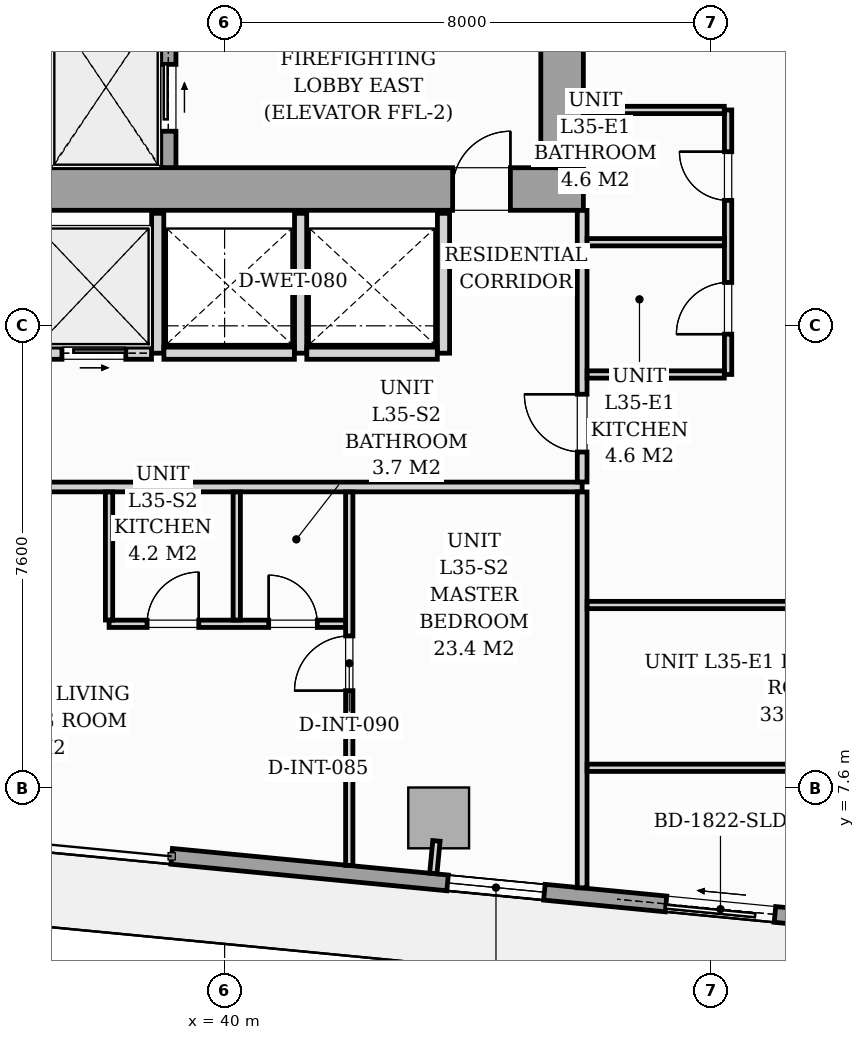
"""IFC4 building model, lengths in metres.
Left out: names, types, materials, properties, quantities, classifications, styles, units other than length and angle.
Written with IfcOpenShell. Run it as: python <this file> out.ifc"""

import sys

from ifc_helpers import new_model, si_unit, direction, frame, frame_2d, origin, origin_2d, place, context, subcontext, project, spatial, rectangle, i_section, extrude, source, transform, mapped, element, fill, save


model = new_model("IFC4")
c1 = context("Model", 3, precision=1e-05, world=origin(), true_north=direction((0.0, 1.0)))
c2 = subcontext(c1, "Body", "Model", "MODEL_VIEW")
j1 = project(units=[si_unit("LENGTHUNIT", "METRE"), si_unit("PLANEANGLEUNIT", "RADIAN")], contexts=[c1])
p1 = place(None, origin())
s1 = spatial("IfcSite", under=j1, at=p1, CompositionType="ELEMENT")
p2 = place(p1, origin())
s2 = spatial("IfcBuilding", under=s1, at=p2, CompositionType="ELEMENT")
p3 = place(p2, frame((0.0, 0.0, 124.6)))
s3 = spatial("IfcBuildingStorey", under=s2, at=p3, CompositionType="ELEMENT", Elevation=124.6)
m1 = source(origin(), c2, "Body", "SweptSolid", [
    extrude(i_section(OverallWidth=0.421, OverallDepth=0.465, WebThickness=0.045, FlangeThickness=0.073, FilletRadius=0.018, at=origin_2d()), origin(), (0.0, 0.0, 1.0), 3.196),
])
for number, where, z_axis, x_axis in (
    (1, (38.88, 17.4, 0.002), (0.0, 0.0, 1.0), (1.0, 0.0, 0.0)),
    (2, (45.6, 17.4, 0.002), (0.0, 0.0, 1.0), (1.0, 0.0, 0.0)),
):
    element("IfcColumn", number, at=place(p3, frame(where, z_axis=z_axis, x_axis=x_axis)), inside=s3, PredefinedType="PILASTER", context=c2, shape_type="MappedRepresentation", body=[
        mapped(m1, transform((0.0, 0.0, 0.0), scale=1.0)),
    ])
m2 = source(origin(), c2, "Body", "SweptSolid", [
    extrude(rectangle(XDim=1.0, YDim=1.0, at=origin_2d()), origin(), (0.0, 0.0, 1.0), 3.194),
])
p4 = place(p3, frame((43.521, 7.108, 0.004), z_axis=(0.0, 0.0, 1.0), x_axis=(0.995396198367, -0.09584575252, 0.0)))
e3 = element("IfcColumn", 3, at=p4, inside=s3, PredefinedType="COLUMN", context=c2, shape_type="MappedRepresentation", body=[
    mapped(m2, transform((0.0, 0.0, 0.0), scale=1.0)),
])
p5 = place(p3, frame((56.061, 4.845, 0.0), z_axis=(0.0, 0.0, 1.0), x_axis=(-0.995395976631, 0.095848055311, 0.0)))
e4 = element("IfcWall", 4, at=p5, inside=s3, PredefinedType="STANDARD", context=c2, shape_type="SweptSolid", body=[
    extrude(rectangle(XDim=17.01, YDim=0.26, at=frame_2d((8.505, 0.0))), origin(), (0.0, 0.0, 1.0), 2.94),
])
p6 = place(p5, frame((7.043, 0.0, 0.0)))
e5 = element("IfcOpeningElement", 5, at=p6, cuts=e4, PredefinedType="OPENING", context=c2, shape_type="SweptSolid", body=[
    extrude(rectangle(XDim=1.8, YDim=2.06, at=frame_2d((0.9, 1.03))), frame((0.0, 0.14, 0.0), z_axis=(0.0, -1.0, 0.0), x_axis=(1.0, 0.0, 0.0)), (0.0, 0.0, 1.0), 0.28),
])
p7 = place(p5, frame((2.05, 0.0, 0.65)))
e6 = element("IfcOpeningElement", 6, at=p7, cuts=e4, PredefinedType="OPENING", context=c2, shape_type="SweptSolid", body=[
    extrude(rectangle(XDim=1.6, YDim=1.5, at=frame_2d((0.8, 0.75))), frame((0.0, 0.14, 0.0), z_axis=(0.0, -1.0, 0.0), x_axis=(1.0, 0.0, 0.0)), (0.0, 0.0, 1.0), 0.28),
])
p8 = place(p5, frame((10.852, 0.0, 0.75)))
e7 = element("IfcOpeningElement", 7, at=p8, cuts=e4, PredefinedType="OPENING", context=c2, shape_type="SweptSolid", body=[
    extrude(rectangle(XDim=1.6, YDim=1.5, at=frame_2d((0.8, 0.75))), frame((0.0, 0.14, 0.0), z_axis=(0.0, -1.0, 0.0), x_axis=(1.0, 0.0, 0.0)), (0.0, 0.0, 1.0), 0.28),
])
p9 = place(p3, frame((26.1, 17.45, 0.0), z_axis=(0.0, 0.0, 1.0), x_axis=(1.0, 0.0, 0.0)))
e8 = element("IfcWall", 8, at=p9, inside=s3, PredefinedType="SHEAR", context=c2, shape_type="SweptSolid", body=[
    extrude(rectangle(XDim=19.8, YDim=0.7, at=frame_2d((9.9, 0.0))), origin(), (0.0, 0.0, 1.0), 3.2),
])
p10 = place(p9, frame((1.05, 0.0, 0.0)))
e9 = element("IfcOpeningElement", 9, at=p10, cuts=e8, PredefinedType="OPENING", context=c2, shape_type="SweptSolid", body=[
    extrude(rectangle(XDim=0.95, YDim=2.06, at=frame_2d((0.475, 1.03))), frame((0.0, 0.36, 0.0), z_axis=(0.0, -1.0, 0.0), x_axis=(1.0, 0.0, 0.0)), (0.0, 0.0, 1.0), 0.72),
])
p11 = place(p9, frame((9.48, 0.0, 0.0)))
e10 = element("IfcOpeningElement", 10, at=p11, cuts=e8, PredefinedType="OPENING", context=c2, shape_type="SweptSolid", body=[
    extrude(rectangle(XDim=0.85, YDim=2.0, at=frame_2d((0.425, 1.0))), frame((0.0, 0.36, 0.0), z_axis=(0.0, -1.0, 0.0), x_axis=(1.0, 0.0, 0.0)), (0.0, 0.0, 1.0), 0.72),
])
p12 = place(p9, frame((17.65, 0.0, 0.0)))
e11 = element("IfcOpeningElement", 11, at=p12, cuts=e8, PredefinedType="OPENING", context=c2, shape_type="SweptSolid", body=[
    extrude(rectangle(XDim=0.95, YDim=2.06, at=frame_2d((0.475, 1.03))), frame((0.0, 0.36, 0.0), z_axis=(0.0, -1.0, 0.0), x_axis=(1.0, 0.0, 0.0)), (0.0, 0.0, 1.0), 0.72),
])
p13 = place(p3, frame((45.55, 17.802, 0.0), z_axis=(0.0, 0.0, 1.0), x_axis=(0.0, 1.0, 0.0)))
e12 = element("IfcWall", 12, at=p13, inside=s3, PredefinedType="SHEAR", context=c2, shape_type="SweptSolid", body=[
    extrude(rectangle(XDim=5.796, YDim=0.7, at=frame_2d((2.898, 0.0))), origin(), (0.0, 0.0, 1.0), 3.2),
])
p14 = place(p3, frame((37.1, 17.802, 0.0), z_axis=(0.0, 0.0, 1.0), x_axis=(0.0, 1.0, 0.0)))
e13 = element("IfcWall", 13, at=p14, inside=s3, PredefinedType="PARTITIONING", context=c2, shape_type="SweptSolid", body=[
    extrude(rectangle(XDim=2.646, YDim=0.16, at=frame_2d((1.323, 0.0))), origin(), (0.0, 0.0, 1.0), 2.94),
])
p15 = place(p3, frame((39.075, 17.802, 0.0), z_axis=(0.0, 0.0, 1.0), x_axis=(0.0, 1.0, 0.0)))
e14 = element("IfcWall", 14, at=p15, inside=s3, PredefinedType="SOLIDWALL", context=c2, shape_type="SweptSolid", body=[
    extrude(rectangle(XDim=2.646, YDim=0.25, at=frame_2d((1.323, 0.0))), origin(), (0.0, 0.0, 1.0), 3.2),
])
p16 = place(p15, frame((0.598, 0.0, 0.0)))
e15 = element("IfcOpeningElement", 15, at=p16, cuts=e14, PredefinedType="OPENING", context=c2, shape_type="SweptSolid", body=[
    extrude(rectangle(XDim=1.1, YDim=2.08, at=frame_2d((0.55, 1.04))), frame((0.0, 0.135, 0.0), z_axis=(0.0, -1.0, 0.0), x_axis=(1.0, 0.0, 0.0)), (0.0, 0.0, 1.0), 0.27),
])
p17 = place(p3, frame((38.9, 14.75, 0.0), z_axis=(0.0, 0.0, 1.0), x_axis=(0.0, 1.0, 0.0)))
e16 = element("IfcWall", 16, at=p17, inside=s3, PredefinedType="PARTITIONING", context=c2, shape_type="SweptSolid", body=[
    extrude(rectangle(XDim=2.3, YDim=0.2, at=frame_2d((1.15, 0.0))), origin(), (0.0, 0.0, 1.0), 2.94),
])
p18 = place(p3, frame((36.902, 14.75, 0.0), z_axis=(0.0, 0.0, 1.0), x_axis=(1.0, 0.0, 0.0)))
e17 = element("IfcWall", 17, at=p18, inside=s3, PredefinedType="PARTITIONING", context=c2, shape_type="SweptSolid", body=[
    extrude(rectangle(XDim=1.896, YDim=0.2, at=frame_2d((0.948, 0.0))), origin(), (0.0, 0.0, 1.0), 2.94),
])
p19 = place(p18, frame((0.423, 0.0, 0.0)))
e18 = element("IfcOpeningElement", 18, at=p19, cuts=e17, PredefinedType="OPENING", context=c2, shape_type="SweptSolid", body=[
    extrude(rectangle(XDim=1.05, YDim=2.08, at=frame_2d((0.525, 1.04))), frame((0.0, 0.11, 0.0), z_axis=(0.0, -1.0, 0.0), x_axis=(1.0, 0.0, 0.0)), (0.0, 0.0, 1.0), 0.22),
])
for number, where, z_axis, x_axis in (
    (19, (41.25, 14.75, 0.0), (0.0, 0.0, 1.0), (0.0, 1.0, 0.0)),
    (20, (43.6, 14.75, 0.0), (0.0, 0.0, 1.0), (0.0, 1.0, 0.0)),
):
    element("IfcWall", number, at=place(p3, frame(where, z_axis=z_axis, x_axis=x_axis)), inside=s3, PredefinedType="PARTITIONING", context=c2, shape_type="SweptSolid", body=[
        extrude(rectangle(XDim=2.3, YDim=0.2, at=frame_2d((1.15, 0.0))), origin(), (0.0, 0.0, 1.0), 2.94),
    ])
for number, where, z_axis, x_axis in (
    (21, (39.002, 14.75, 0.0), (0.0, 0.0, 1.0), (1.0, 0.0, 0.0)),
    (22, (41.352, 14.75, 0.0), (0.0, 0.0, 1.0), (1.0, 0.0, 0.0)),
):
    element("IfcWall", number, at=place(p3, frame(where, z_axis=z_axis, x_axis=x_axis)), inside=s3, PredefinedType="PARTITIONING", context=c2, shape_type="SweptSolid", body=[
        extrude(rectangle(XDim=2.146, YDim=0.2, at=frame_2d((1.073, 0.0))), origin(), (0.0, 0.0, 1.0), 2.94),
    ])
p20 = place(p3, frame((22.05, 12.55, 0.0), z_axis=(0.0, 0.0, 1.0), x_axis=(1.0, 0.0, 0.0)))
e23 = element("IfcWall", 23, at=p20, inside=s3, PredefinedType="PARTITIONING", context=c2, shape_type="SweptSolid", body=[
    extrude(rectangle(XDim=23.83, YDim=0.16, at=frame_2d((11.915, 0.0))), origin(), (0.0, 0.0, 1.0), 2.94),
])
p21 = place(p20, frame((0.655, 0.0, 0.0)))
e24 = element("IfcOpeningElement", 24, at=p21, cuts=e23, PredefinedType="OPENING", context=c2, shape_type="SweptSolid", body=[
    extrude(rectangle(XDim=0.95, YDim=2.06, at=frame_2d((0.475, 1.03))), frame((0.0, 0.09, 0.0), z_axis=(0.0, -1.0, 0.0), x_axis=(1.0, 0.0, 0.0)), (0.0, 0.0, 1.0), 0.18),
])
p22 = place(p20, frame((12.04, 0.0, 0.0)))
e25 = element("IfcOpeningElement", 25, at=p22, cuts=e23, PredefinedType="OPENING", context=c2, shape_type="SweptSolid", body=[
    extrude(rectangle(XDim=0.95, YDim=2.06, at=frame_2d((0.475, 1.03))), frame((0.0, 0.09, 0.0), z_axis=(0.0, -1.0, 0.0), x_axis=(1.0, 0.0, 0.0)), (0.0, 0.0, 1.0), 0.18),
])
p23 = place(p3, frame((45.88, 5.958, 0.0), z_axis=(0.0, 0.0, 1.0), x_axis=(0.0, 1.0, 0.0)))
e26 = element("IfcWall", 26, at=p23, inside=s3, PredefinedType="PARTITIONING", context=c2, shape_type="SweptSolid", body=[
    extrude(rectangle(XDim=6.51, YDim=0.16, at=frame_2d((3.255, 0.0))), origin(), (0.0, 0.0, 1.0), 2.94),
])
p24 = place(p3, frame((45.88, 12.632, 0.0), z_axis=(0.0, 0.0, 1.0), x_axis=(0.0, 1.0, 0.0)))
e27 = element("IfcWall", 27, at=p24, inside=s3, PredefinedType="PARTITIONING", context=c2, shape_type="SweptSolid", body=[
    extrude(rectangle(XDim=4.466, YDim=0.16, at=frame_2d((2.233, 0.0))), origin(), (0.0, 0.0, 1.0), 2.94),
])
p25 = place(p24, frame((0.493, 0.0, 0.0)))
e28 = element("IfcOpeningElement", 28, at=p25, cuts=e27, PredefinedType="OPENING", context=c2, shape_type="SweptSolid", body=[
    extrude(rectangle(XDim=0.95, YDim=2.06, at=frame_2d((0.475, 1.03))), frame((0.0, 0.09, 0.0), z_axis=(0.0, -1.0, 0.0), x_axis=(1.0, 0.0, 0.0)), (0.0, 0.0, 1.0), 0.18),
])
p26 = place(p3, frame((42.05, 6.327, 0.0), z_axis=(0.0, 0.0, 1.0), x_axis=(0.0, 1.0, 0.0)))
e29 = element("IfcWall", 29, at=p26, inside=s3, PredefinedType="PARTITIONING", context=c2, shape_type="SweptSolid", body=[
    extrude(rectangle(XDim=6.141, YDim=0.12, at=frame_2d((3.07, 0.0))), origin(), (0.0, 0.0, 1.0), 2.94),
])
p27 = place(p26, frame((2.873, 0.0, 0.0)))
e30 = element("IfcOpeningElement", 30, at=p27, cuts=e29, PredefinedType="OPENING", context=c2, shape_type="SweptSolid", body=[
    extrude(rectangle(XDim=0.9, YDim=2.05, at=frame_2d((0.45, 1.025))), frame((0.0, 0.07, 0.0), z_axis=(0.0, -1.0, 0.0), x_axis=(1.0, 0.0, 0.0)), (0.0, 0.0, 1.0), 0.14),
])
p28 = place(p3, frame((38.1, 10.3, 0.0), z_axis=(0.0, 0.0, 1.0), x_axis=(1.0, 0.0, 0.0)))
e31 = element("IfcWall", 31, at=p28, inside=s3, PredefinedType="PARTITIONING", context=c2, shape_type="SweptSolid", body=[
    extrude(rectangle(XDim=3.888, YDim=0.12, at=frame_2d((1.944, 0.0))), origin(), (0.0, 0.0, 1.0), 2.94),
])
p29 = place(p28, frame((0.625, 0.0, 0.0)))
e32 = element("IfcOpeningElement", 32, at=p29, cuts=e31, PredefinedType="OPENING", context=c2, shape_type="SweptSolid", body=[
    extrude(rectangle(XDim=0.85, YDim=2.05, at=frame_2d((0.425, 1.025))), frame((0.0, 0.07, 0.0), z_axis=(0.0, -1.0, 0.0), x_axis=(1.0, 0.0, 0.0)), (0.0, 0.0, 1.0), 0.14),
])
p30 = place(p28, frame((2.625, 0.0, 0.0)))
e33 = element("IfcOpeningElement", 33, at=p30, cuts=e31, PredefinedType="OPENING", context=c2, shape_type="SweptSolid", body=[
    extrude(rectangle(XDim=0.8, YDim=2.02, at=frame_2d((0.4, 1.01))), frame((0.0, 0.07, 0.0), z_axis=(0.0, -1.0, 0.0), x_axis=(1.0, 0.0, 0.0)), (0.0, 0.0, 1.0), 0.14),
])
for number, where, z_axis, x_axis in (
    (34, (40.2, 10.362, 0.0), (0.0, 0.0, 1.0), (0.0, 1.0, 0.0)),
    (35, (38.1, 10.362, 0.0), (0.0, 0.0, 1.0), (0.0, 1.0, 0.0)),
):
    element("IfcWall", number, at=place(p3, frame(where, z_axis=z_axis, x_axis=x_axis)), inside=s3, PredefinedType="PARTITIONING", context=c2, shape_type="SweptSolid", body=[
        extrude(rectangle(XDim=2.106, YDim=0.12, at=frame_2d((1.053, 0.0))), origin(), (0.0, 0.0, 1.0), 2.94),
    ])
p31 = place(p3, frame((48.28, 14.4, 0.0), z_axis=(0.0, 0.0, 1.0), x_axis=(0.0, 1.0, 0.0)))
e36 = element("IfcWall", 36, at=p31, inside=s3, PredefinedType="PARTITIONING", context=c2, shape_type="SweptSolid", body=[
    extrude(rectangle(XDim=4.35, YDim=0.12, at=frame_2d((2.175, 0.0))), origin(), (0.0, 0.0, 1.0), 2.94),
])
p32 = place(p31, frame((0.663, 0.0, 0.0)))
e37 = element("IfcOpeningElement", 37, at=p32, cuts=e36, PredefinedType="OPENING", context=c2, shape_type="SweptSolid", body=[
    extrude(rectangle(XDim=0.85, YDim=2.05, at=frame_2d((0.425, 1.025))), frame((0.0, 0.07, 0.0), z_axis=(0.0, -1.0, 0.0), x_axis=(1.0, 0.0, 0.0)), (0.0, 0.0, 1.0), 0.14),
])
p33 = place(p31, frame((2.863, 0.0, 0.0)))
e38 = element("IfcOpeningElement", 38, at=p33, cuts=e36, PredefinedType="OPENING", context=c2, shape_type="SweptSolid", body=[
    extrude(rectangle(XDim=0.8, YDim=2.02, at=frame_2d((0.4, 1.01))), frame((0.0, 0.07, 0.0), z_axis=(0.0, -1.0, 0.0), x_axis=(1.0, 0.0, 0.0)), (0.0, 0.0, 1.0), 0.14),
])
for number, where, z_axis, x_axis in (
    (39, (45.962, 16.575, 0.0), (0.0, 0.0, 1.0), (1.0, 0.0, 0.0)),
    (40, (45.962, 14.4, 0.0), (0.0, 0.0, 1.0), (1.0, 0.0, 0.0)),
):
    element("IfcWall", number, at=place(p3, frame(where, z_axis=z_axis, x_axis=x_axis)), inside=s3, PredefinedType="PARTITIONING", context=c2, shape_type="SweptSolid", body=[
        extrude(rectangle(XDim=2.256, YDim=0.12, at=frame_2d((1.128, 0.0))), origin(), (0.0, 0.0, 1.0), 2.94),
    ])
p34 = place(p3, frame((45.902, 18.75, 0.0), z_axis=(0.0, 0.0, 1.0), x_axis=(1.0, 0.0, 0.0)))
e41 = element("IfcWall", 41, at=p34, inside=s3, PredefinedType="PARTITIONING", context=c2, shape_type="SweptSolid", body=[
    extrude(rectangle(XDim=2.316, YDim=0.12, at=frame_2d((1.158, 0.0))), origin(), (0.0, 0.0, 1.0), 2.94),
])
p35 = place(p3, frame((45.962, 7.932, 0.0), z_axis=(0.0, 0.0, 1.0), x_axis=(1.0, 0.0, 0.0)))
e42 = element("IfcWall", 42, at=p35, inside=s3, PredefinedType="PARTITIONING", context=c2, shape_type="SweptSolid", body=[
    extrude(rectangle(XDim=12.828, YDim=0.12, at=frame_2d((6.414, 0.0))), origin(), (0.0, 0.0, 1.0), 2.94),
])
p36 = place(p35, frame((5.995, 0.0, 0.0)))
e43 = element("IfcOpeningElement", 43, at=p36, cuts=e42, PredefinedType="OPENING", context=c2, shape_type="SweptSolid", body=[
    extrude(rectangle(XDim=0.85, YDim=2.05, at=frame_2d((0.425, 1.025))), frame((0.0, 0.07, 0.0), z_axis=(0.0, -1.0, 0.0), x_axis=(1.0, 0.0, 0.0)), (0.0, 0.0, 1.0), 0.14),
])
p37 = place(p3, frame((45.962, 10.609, 0.0), z_axis=(0.0, 0.0, 1.0), x_axis=(1.0, 0.0, 0.0)))
e44 = element("IfcWall", 44, at=p37, inside=s3, PredefinedType="PARTITIONING", context=c2, shape_type="SweptSolid", body=[
    extrude(rectangle(XDim=13.085, YDim=0.12, at=frame_2d((6.543, 0.0))), origin(), (0.0, 0.0, 1.0), 2.94),
])
p38 = place(p37, frame((7.94, 0.0, 0.0)))
e45 = element("IfcOpeningElement", 45, at=p38, cuts=e44, PredefinedType="OPENING", context=c2, shape_type="SweptSolid", body=[
    extrude(rectangle(XDim=0.85, YDim=2.05, at=frame_2d((0.425, 1.025))), frame((0.0, 0.07, 0.0), z_axis=(0.0, -1.0, 0.0), x_axis=(1.0, 0.0, 0.0)), (0.0, 0.0, 1.0), 0.14),
])
p39 = place(p3, frame((43.484, 6.729, 0.0), z_axis=(0.0, 0.0, 1.0), x_axis=(-0.095772948675, -0.995403205893, 0.0)))
e46 = element("IfcWall", 46, at=p39, inside=s3, PredefinedType="PARTITIONING", context=c2, shape_type="SweptSolid", body=[
    extrude(rectangle(XDim=0.538, YDim=0.12, at=frame_2d((0.269, 0.0))), origin(), (0.0, 0.0, 1.0), 2.94),
])
m3 = source(origin(), c2, "Body", "SweptSolid", [
    extrude(rectangle(XDim=1.8, YDim=2.06, at=frame_2d((0.9, 1.03))), frame((0.0, 0.025, 0.0), z_axis=(0.0, -1.0, 0.0), x_axis=(1.0, 0.0, 0.0)), (0.0, 0.0, 1.0), 0.05),
])
p40 = place(p6, origin())
e47 = element("IfcDoor", 47, at=p40, inside=s3, OperationType="SLIDING_TO_RIGHT", PredefinedType="DOOR", context=c2, shape_type="MappedRepresentation", body=[
    mapped(m3, transform((0.0, 0.0, 0.0), scale=1.0)),
])
fill(e5, e47)
m4 = source(origin(), c2, "Body", "SweptSolid", [
    extrude(rectangle(XDim=1.6, YDim=1.5, at=frame_2d((0.8, 0.75))), frame((0.0, 0.03, 0.0), z_axis=(0.0, -1.0, 0.0), x_axis=(1.0, 0.0, 0.0)), (0.0, 0.0, 1.0), 0.06),
])
p41 = place(p8, origin())
e48 = element("IfcWindow", 48, at=p41, inside=s3, PartitioningType="SINGLE_PANEL", PredefinedType="WINDOW", context=c2, shape_type="MappedRepresentation", body=[
    mapped(m4, transform((0.0, 0.0, 0.0), scale=1.0)),
])
fill(e7, e48)
m5 = source(origin(), c2, "Body", "SweptSolid", [
    extrude(rectangle(XDim=0.95, YDim=2.06, at=frame_2d((0.475, 1.03))), frame((0.0, 0.025, 0.0), z_axis=(0.0, -1.0, 0.0), x_axis=(1.0, 0.0, 0.0)), (0.0, 0.0, 1.0), 0.05),
])
p42 = place(p12, origin())
e49 = element("IfcDoor", 49, at=p42, inside=s3, OperationType="SINGLE_SWING_RIGHT", PredefinedType="DOOR", context=c2, shape_type="MappedRepresentation", body=[
    mapped(m5, transform((0.0, 0.0, 0.0), scale=1.0)),
])
fill(e11, e49)
m6 = source(origin(), c2, "Body", "SweptSolid", [
    extrude(rectangle(XDim=1.1, YDim=2.08, at=frame_2d((0.55, 1.04))), frame((0.0, 0.025, 0.0), z_axis=(0.0, -1.0, 0.0), x_axis=(1.0, 0.0, 0.0)), (0.0, 0.0, 1.0), 0.05),
])
p43 = place(p16, origin())
e50 = element("IfcDoor", 50, at=p43, inside=s3, OperationType="SLIDING_TO_RIGHT", PredefinedType="DOOR", context=c2, shape_type="MappedRepresentation", body=[
    mapped(m6, transform((0.0, 0.0, 0.0), scale=1.0)),
])
fill(e15, e50)
m7 = source(origin(), c2, "Body", "SweptSolid", [
    extrude(rectangle(XDim=1.05, YDim=2.08, at=frame_2d((0.525, 1.04))), frame((0.0, 0.025, 0.0), z_axis=(0.0, -1.0, 0.0), x_axis=(1.0, 0.0, 0.0)), (0.0, 0.0, 1.0), 0.05),
])
p44 = place(p19, origin())
e51 = element("IfcDoor", 51, at=p44, inside=s3, OperationType="SLIDING_TO_RIGHT", PredefinedType="DOOR", context=c2, shape_type="MappedRepresentation", body=[
    mapped(m7, transform((0.0, 0.0, 0.0), scale=1.0)),
])
fill(e18, e51)
m8 = source(origin(), c2, "Body", "SweptSolid", [
    extrude(rectangle(XDim=0.9, YDim=2.05, at=frame_2d((0.45, 1.025))), frame((0.0, 0.025, 0.0), z_axis=(0.0, -1.0, 0.0), x_axis=(1.0, 0.0, 0.0)), (0.0, 0.0, 1.0), 0.05),
])
p45 = place(p27, origin())
e52 = element("IfcDoor", 52, at=p45, inside=s3, OperationType="SINGLE_SWING_LEFT", PredefinedType="DOOR", context=c2, shape_type="MappedRepresentation", body=[
    mapped(m8, transform((0.0, 0.0, 0.0), scale=1.0)),
])
fill(e30, e52)
m9 = source(origin(), c2, "Body", "SweptSolid", [
    extrude(rectangle(XDim=0.85, YDim=2.05, at=frame_2d((0.425, 1.025))), frame((0.0, 0.025, 0.0), z_axis=(0.0, -1.0, 0.0), x_axis=(1.0, 0.0, 0.0)), (0.0, 0.0, 1.0), 0.05),
])
p46 = place(p29, origin())
e53 = element("IfcDoor", 53, at=p46, inside=s3, OperationType="SINGLE_SWING_RIGHT", PredefinedType="DOOR", context=c2, shape_type="MappedRepresentation", body=[
    mapped(m9, transform((0.0, 0.0, 0.0), scale=1.0)),
])
fill(e32, e53)
m10 = source(origin(), c2, "Body", "SweptSolid", [
    extrude(rectangle(XDim=0.8, YDim=2.02, at=frame_2d((0.4, 1.01))), frame((0.0, 0.025, 0.0), z_axis=(0.0, -1.0, 0.0), x_axis=(1.0, 0.0, 0.0)), (0.0, 0.0, 1.0), 0.05),
])
p47 = place(p30, origin())
e54 = element("IfcDoor", 54, at=p47, inside=s3, OperationType="SINGLE_SWING_LEFT", PredefinedType="DOOR", context=c2, shape_type="MappedRepresentation", body=[
    mapped(m10, transform((0.0, 0.0, 0.0), scale=1.0)),
])
fill(e33, e54)
m11 = source(origin(), c2, "Body", "SweptSolid", [
    extrude(rectangle(XDim=0.95, YDim=2.06, at=frame_2d((0.475, 1.03))), frame((0.0, 0.025, 0.0), z_axis=(0.0, -1.0, 0.0), x_axis=(1.0, 0.0, 0.0)), (0.0, 0.0, 1.0), 0.05),
])
p48 = place(p25, origin())
e55 = element("IfcDoor", 55, at=p48, inside=s3, OperationType="SINGLE_SWING_RIGHT", PredefinedType="DOOR", context=c2, shape_type="MappedRepresentation", body=[
    mapped(m11, transform((0.0, 0.0, 0.0), scale=1.0)),
])
fill(e28, e55)
p49 = place(p32, origin())
e56 = element("IfcDoor", 56, at=p49, inside=s3, OperationType="SINGLE_SWING_LEFT", PredefinedType="DOOR", context=c2, shape_type="MappedRepresentation", body=[
    mapped(m9, transform((0.0, 0.0, 0.0), scale=1.0)),
])
fill(e37, e56)
p50 = place(p33, origin())
e57 = element("IfcDoor", 57, at=p50, inside=s3, OperationType="SINGLE_SWING_RIGHT", PredefinedType="DOOR", context=c2, shape_type="MappedRepresentation", body=[
    mapped(m10, transform((0.0, 0.0, 0.0), scale=1.0)),
])
fill(e38, e57)
save(model, sys.argv[1])
